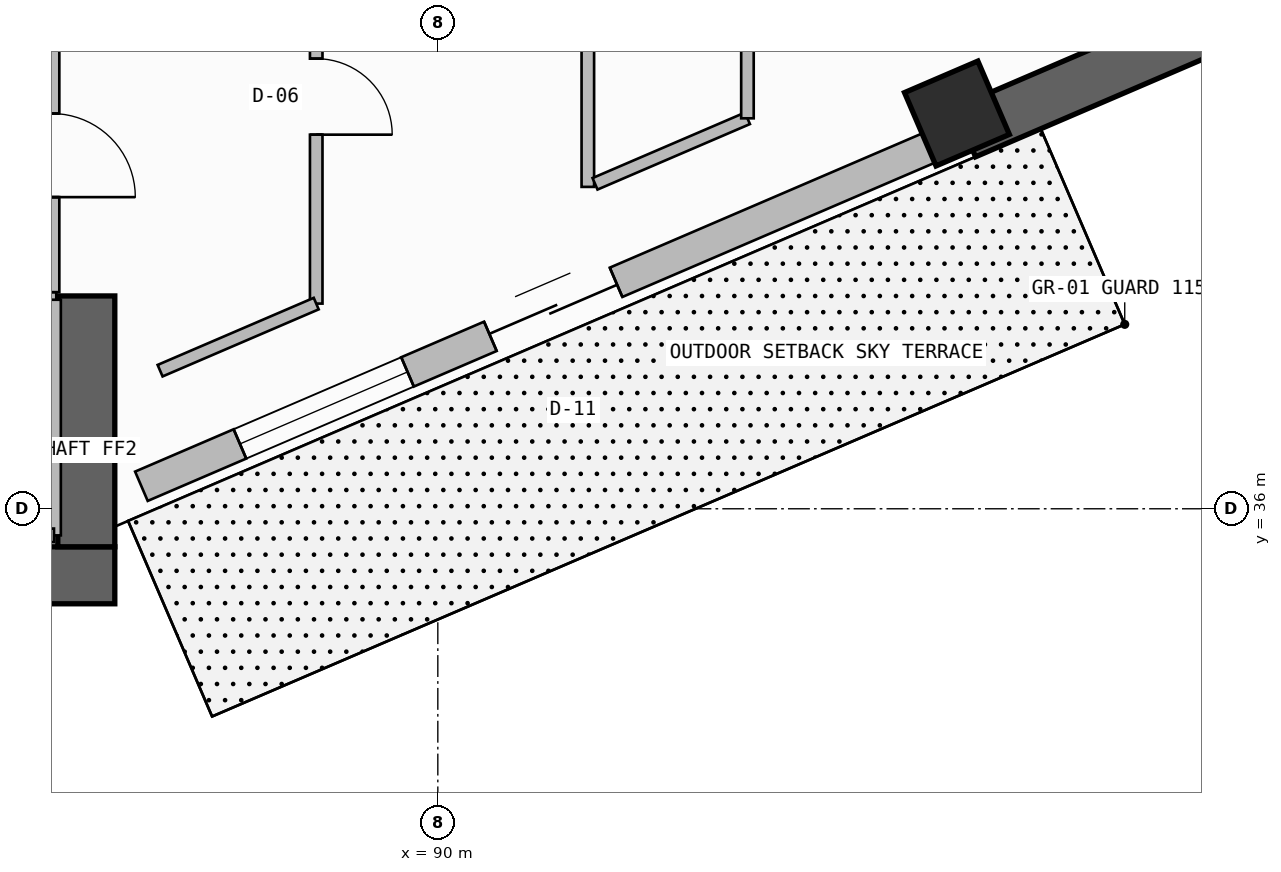
"""IFC4 building model, lengths in metres.
Left out: names, types, materials, properties, quantities, classifications, styles, units other than length and angle.
Written with IfcOpenShell. Run it as: python <this file> out.ifc"""

import sys

from ifc_helpers import new_model, si_unit, direction, frame, frame_2d, origin, origin_2d, place, context, subcontext, project, spatial, rectangle, extrude, element, fill, save


model = new_model("IFC4")
c1 = context("Model", 3, precision=1e-05, world=origin(), true_north=direction((0.0, 1.0)))
c2 = subcontext(c1, "Body", "Model", "MODEL_VIEW")
j1 = project(units=[si_unit("LENGTHUNIT", "METRE"), si_unit("PLANEANGLEUNIT", "RADIAN")], contexts=[c1])
p1 = place(None, origin())
s1 = spatial("IfcSite", under=j1, at=p1, CompositionType="ELEMENT")
p2 = place(p1, origin())
s2 = spatial("IfcBuilding", under=s1, at=p2, CompositionType="ELEMENT")
p3 = place(p2, frame((0.0, 0.0, 164.7)))
s3 = spatial("IfcBuildingStorey", under=s2, at=p3, CompositionType="ELEMENT", Elevation=164.7)
p4 = place(p3, frame((72.15, 35.125, -0.4), z_axis=(0.0, 0.0, 1.0), x_axis=(1.0, 0.0, 0.0)))
e1 = element("IfcWall", 1, at=p4, inside=s3, PredefinedType="SHEAR", context=c2, shape_type="SweptSolid", body=[
    extrude(rectangle(XDim=13.6, YDim=0.75, at=frame_2d((6.8, 0.0))), origin(), (0.0, 0.0, 1.0), 3.74),
])
p5 = place(p3, frame((85.375, 35.5, -0.4), z_axis=(0.0, 0.0, 1.0), x_axis=(0.0, 1.0, 0.0)))
e2 = element("IfcWall", 2, at=p5, inside=s3, PredefinedType="SHEAR", context=c2, shape_type="SweptSolid", body=[
    extrude(rectangle(XDim=3.3, YDim=0.75, at=frame_2d((1.65, 0.0))), origin(), (0.0, 0.0, 1.0), 3.74),
])
p6 = place(p3, frame((96.83, 41.2, -0.4), z_axis=(0.0, 0.0, 1.0), x_axis=(0.918791210149, 0.394743856384, 0.0)))
e3 = element("IfcColumn", 3, at=p6, inside=s3, PredefinedType="COLUMN", context=c2, shape_type="SweptSolid", body=[
    extrude(rectangle(XDim=1.05, YDim=1.05, at=origin_2d()), origin(), (0.0, 0.0, 1.0), 4.0),
])
p7 = place(p3, frame((86.1, 36.296, 0.0), z_axis=(0.0, 0.0, 1.0), x_axis=(0.918792412723, 0.394741057306, 0.0)))
e4 = element("IfcWall", 4, at=p7, inside=s3, PredefinedType="SOLIDWALL", context=c2, shape_type="SweptSolid", body=[
    extrude(rectangle(XDim=11.794, YDim=0.42, at=frame_2d((5.897, 0.0))), origin(), (0.0, 0.0, 1.0), 2.725),
])
p8 = place(p7, frame((4.997, 0.0, 0.0)))
e5 = element("IfcOpeningElement", 5, at=p8, cuts=e4, PredefinedType="OPENING", context=c2, shape_type="SweptSolid", body=[
    extrude(rectangle(XDim=1.8, YDim=2.35, at=frame_2d((0.9, 1.175))), frame((0.0, 0.22, 0.0), z_axis=(0.0, -1.0, 0.0), x_axis=(1.0, 0.0, 0.0)), (0.0, 0.0, 1.0), 0.44),
])
p9 = place(p7, frame((1.411, 0.0, 1.2)))
e6 = element("IfcOpeningElement", 6, at=p9, cuts=e4, PredefinedType="OPENING", context=c2, shape_type="SweptSolid", body=[
    extrude(rectangle(XDim=2.4, YDim=0.9, at=frame_2d((1.2, 0.45))), frame((0.0, 0.22, 0.0), z_axis=(0.0, -1.0, 0.0), x_axis=(1.0, 0.0, 0.0)), (0.0, 0.0, 1.0), 0.44),
])
p10 = place(p3, frame((96.937, 40.952, -0.4), z_axis=(0.0, 0.0, 1.0), x_axis=(0.918782407933, 0.394764343468, 0.0)))
e7 = element("IfcWall", 7, at=p10, inside=s3, PredefinedType="SHEAR", context=c2, shape_type="SweptSolid", body=[
    extrude(rectangle(XDim=8.402, YDim=0.7, at=frame_2d((4.201, 0.0))), origin(), (0.0, 0.0, 1.0), 3.74),
])
p11 = place(p3, frame((80.72, 38.75, 0.0), z_axis=(0.0, 0.0, 1.0), x_axis=(1.0, 0.0, 0.0)))
e8 = element("IfcWall", 8, at=p11, inside=s3, PredefinedType="SOLIDWALL", context=c2, shape_type="SweptSolid", body=[
    extrude(rectangle(XDim=4.26, YDim=0.2, at=frame_2d((2.13, 0.0))), origin(), (0.0, 0.0, 1.0), 3.34),
])
p12 = place(p11, frame((0.5, 0.0, 0.0)))
e9 = element("IfcOpeningElement", 9, at=p12, cuts=e8, PredefinedType="OPENING", context=c2, shape_type="SweptSolid", body=[
    extrude(rectangle(XDim=1.3, YDim=2.3, at=frame_2d((0.65, 1.15))), frame((0.0, 0.11, 0.0), z_axis=(0.0, -1.0, 0.0), x_axis=(1.0, 0.0, 0.0)), (0.0, 0.0, 1.0), 0.22),
])
p13 = place(p11, frame((2.45, 0.0, 0.0)))
e10 = element("IfcOpeningElement", 10, at=p13, cuts=e8, PredefinedType="OPENING", context=c2, shape_type="SweptSolid", body=[
    extrude(rectangle(XDim=1.3, YDim=2.3, at=frame_2d((0.65, 1.15))), frame((0.0, 0.11, 0.0), z_axis=(0.0, -1.0, 0.0), x_axis=(1.0, 0.0, 0.0)), (0.0, 0.0, 1.0), 0.22),
])
p14 = place(p3, frame((84.95, 35.65, 0.0), z_axis=(0.0, 0.0, 1.0), x_axis=(0.0, 1.0, 0.0)))
e11 = element("IfcWall", 11, at=p14, inside=s3, PredefinedType="SOLIDWALL", context=c2, shape_type="SweptSolid", body=[
    extrude(rectangle(XDim=3.1, YDim=0.18, at=frame_2d((1.55, 0.0))), origin(), (0.0, 0.0, 1.0), 3.34),
])
p15 = place(p3, frame((81.02, 35.65, 0.0), z_axis=(0.0, 0.0, 1.0), x_axis=(1.0, 0.0, 0.0)))
e12 = element("IfcWall", 12, at=p15, inside=s3, PredefinedType="SOLIDWALL", context=c2, shape_type="SweptSolid", body=[
    extrude(rectangle(XDim=3.93, YDim=0.18, at=frame_2d((1.965, 0.0))), origin(), (0.0, 0.0, 1.0), 3.34),
])
p16 = place(p3, frame((84.92, 38.85, 0.0), z_axis=(0.0, 0.0, 1.0), x_axis=(0.0, 1.0, 0.0)))
e13 = element("IfcWall", 13, at=p16, inside=s3, PredefinedType="SOLIDWALL", context=c2, shape_type="SweptSolid", body=[
    extrude(rectangle(XDim=4.83, YDim=0.2, at=frame_2d((2.415, 0.0))), origin(), (0.0, 0.0, 1.0), 3.34),
])
p17 = place(p16, frame((1.25, 0.0, 0.0)))
e14 = element("IfcOpeningElement", 14, at=p17, cuts=e13, PredefinedType="OPENING", context=c2, shape_type="SweptSolid", body=[
    extrude(rectangle(XDim=1.1, YDim=2.2, at=frame_2d((0.55, 1.1))), frame((0.0, 0.11, 0.0), z_axis=(0.0, -1.0, 0.0), x_axis=(1.0, 0.0, 0.0)), (0.0, 0.0, 1.0), 0.22),
])
p18 = place(p3, frame((88.4, 38.699, 0.0), z_axis=(0.0, 0.0, 1.0), x_axis=(0.0, 1.0, 0.0)))
e15 = element("IfcWall", 15, at=p18, inside=s3, PredefinedType="PARTITIONING", context=c2, shape_type="SweptSolid", body=[
    extrude(rectangle(XDim=5.445, YDim=0.165, at=frame_2d((2.723, 0.0))), origin(), (0.0, 0.0, 1.0), 2.825),
])
p19 = place(p18, frame((2.223, 0.0, 0.0)))
e16 = element("IfcOpeningElement", 16, at=p19, cuts=e15, PredefinedType="OPENING", context=c2, shape_type="SweptSolid", body=[
    extrude(rectangle(XDim=1.0, YDim=2.2, at=frame_2d((0.5, 1.1))), frame((0.0, 0.093, 0.0), z_axis=(0.0, -1.0, 0.0), x_axis=(1.0, 0.0, 0.0)), (0.0, 0.0, 1.0), 0.185),
])
p20 = place(p3, frame((91.974, 43.607, 0.0), z_axis=(0.0, 0.0, 1.0), x_axis=(0.0, -1.0, 0.0)))
e17 = element("IfcWall", 17, at=p20, inside=s3, PredefinedType="PARTITIONING", context=c2, shape_type="SweptSolid", body=[
    extrude(rectangle(XDim=3.373, YDim=0.165, at=frame_2d((1.687, 0.0))), origin(), (0.0, 0.0, 1.0), 2.825),
])
p21 = place(p3, frame((92.068, 40.275, 0.0), z_axis=(0.0, 0.0, 1.0), x_axis=(0.91880916067, 0.394702072794, 0.0)))
e18 = element("IfcWall", 18, at=p21, inside=s3, PredefinedType="PARTITIONING", context=c2, shape_type="SweptSolid", body=[
    extrude(rectangle(XDim=2.183, YDim=0.165, at=frame_2d((1.091, 0.0))), origin(), (0.0, 0.0, 1.0), 3.34),
])
p22 = place(p3, frame((86.346, 37.817, 0.0), z_axis=(0.0, 0.0, 1.0), x_axis=(0.918811412195, 0.394696831531, 0.0)))
e19 = element("IfcWall", 19, at=p22, inside=s3, PredefinedType="PARTITIONING", context=c2, shape_type="SweptSolid", body=[
    extrude(rectangle(XDim=2.235, YDim=0.165, at=frame_2d((1.118, 0.0))), origin(), (0.0, 0.0, 1.0), 3.34),
])
p23 = place(p3, frame((94.074, 41.137, 0.0), z_axis=(0.0, 0.0, 1.0), x_axis=(0.0, 1.0, 0.0)))
e20 = element("IfcWall", 20, at=p23, inside=s3, PredefinedType="PARTITIONING", context=c2, shape_type="SweptSolid", body=[
    extrude(rectangle(XDim=2.155, YDim=0.165, at=frame_2d((1.077, 0.0))), origin(), (0.0, 0.0, 1.0), 2.825),
])
p24 = place(p8, origin())
e21 = element("IfcDoor", 21, at=p24, inside=s3, OperationType="DOUBLE_DOOR_SLIDING", PredefinedType="DOOR", context=c2, shape_type="SweptSolid", body=[
    extrude(rectangle(XDim=1.8, YDim=2.35, at=frame_2d((0.9, 1.175))), frame((0.0, 0.025, 0.0), z_axis=(0.0, -1.0, 0.0), x_axis=(1.0, 0.0, 0.0)), (0.0, 0.0, 1.0), 0.05),
])
fill(e5, e21)
p25 = place(p9, origin())
e22 = element("IfcWindow", 22, at=p25, inside=s3, PartitioningType="SINGLE_PANEL", PredefinedType="WINDOW", context=c2, shape_type="SweptSolid", body=[
    extrude(rectangle(XDim=2.4, YDim=0.9, at=frame_2d((1.2, 0.45))), frame((0.0, 0.03, 0.0), z_axis=(0.0, -1.0, 0.0), x_axis=(1.0, 0.0, 0.0)), (0.0, 0.0, 1.0), 0.06),
])
fill(e6, e22)
p26 = place(p17, frame((1.1, 0.0, 0.0), z_axis=(0.0, 0.0, 1.0), x_axis=(-1.0, 0.0, 0.0)))
e23 = element("IfcDoor", 23, at=p26, inside=s3, OperationType="SINGLE_SWING_RIGHT", PredefinedType="DOOR", context=c2, shape_type="SweptSolid", body=[
    extrude(rectangle(XDim=1.1, YDim=2.2, at=frame_2d((0.55, 1.1))), frame((0.0, 0.025, 0.0), z_axis=(0.0, -1.0, 0.0), x_axis=(1.0, 0.0, 0.0)), (0.0, 0.0, 1.0), 0.05),
])
fill(e14, e23)
p27 = place(p19, frame((1.0, 0.0, 0.0), z_axis=(0.0, 0.0, 1.0), x_axis=(-1.0, 0.0, 0.0)))
e24 = element("IfcDoor", 24, at=p27, inside=s3, OperationType="SINGLE_SWING_RIGHT", PredefinedType="DOOR", context=c2, shape_type="SweptSolid", body=[
    extrude(rectangle(XDim=1.0, YDim=2.2, at=frame_2d((0.5, 1.1))), frame((0.0, 0.025, 0.0), z_axis=(0.0, -1.0, 0.0), x_axis=(1.0, 0.0, 0.0)), (0.0, 0.0, 1.0), 0.05),
])
fill(e16, e24)
save(model, sys.argv[1])
